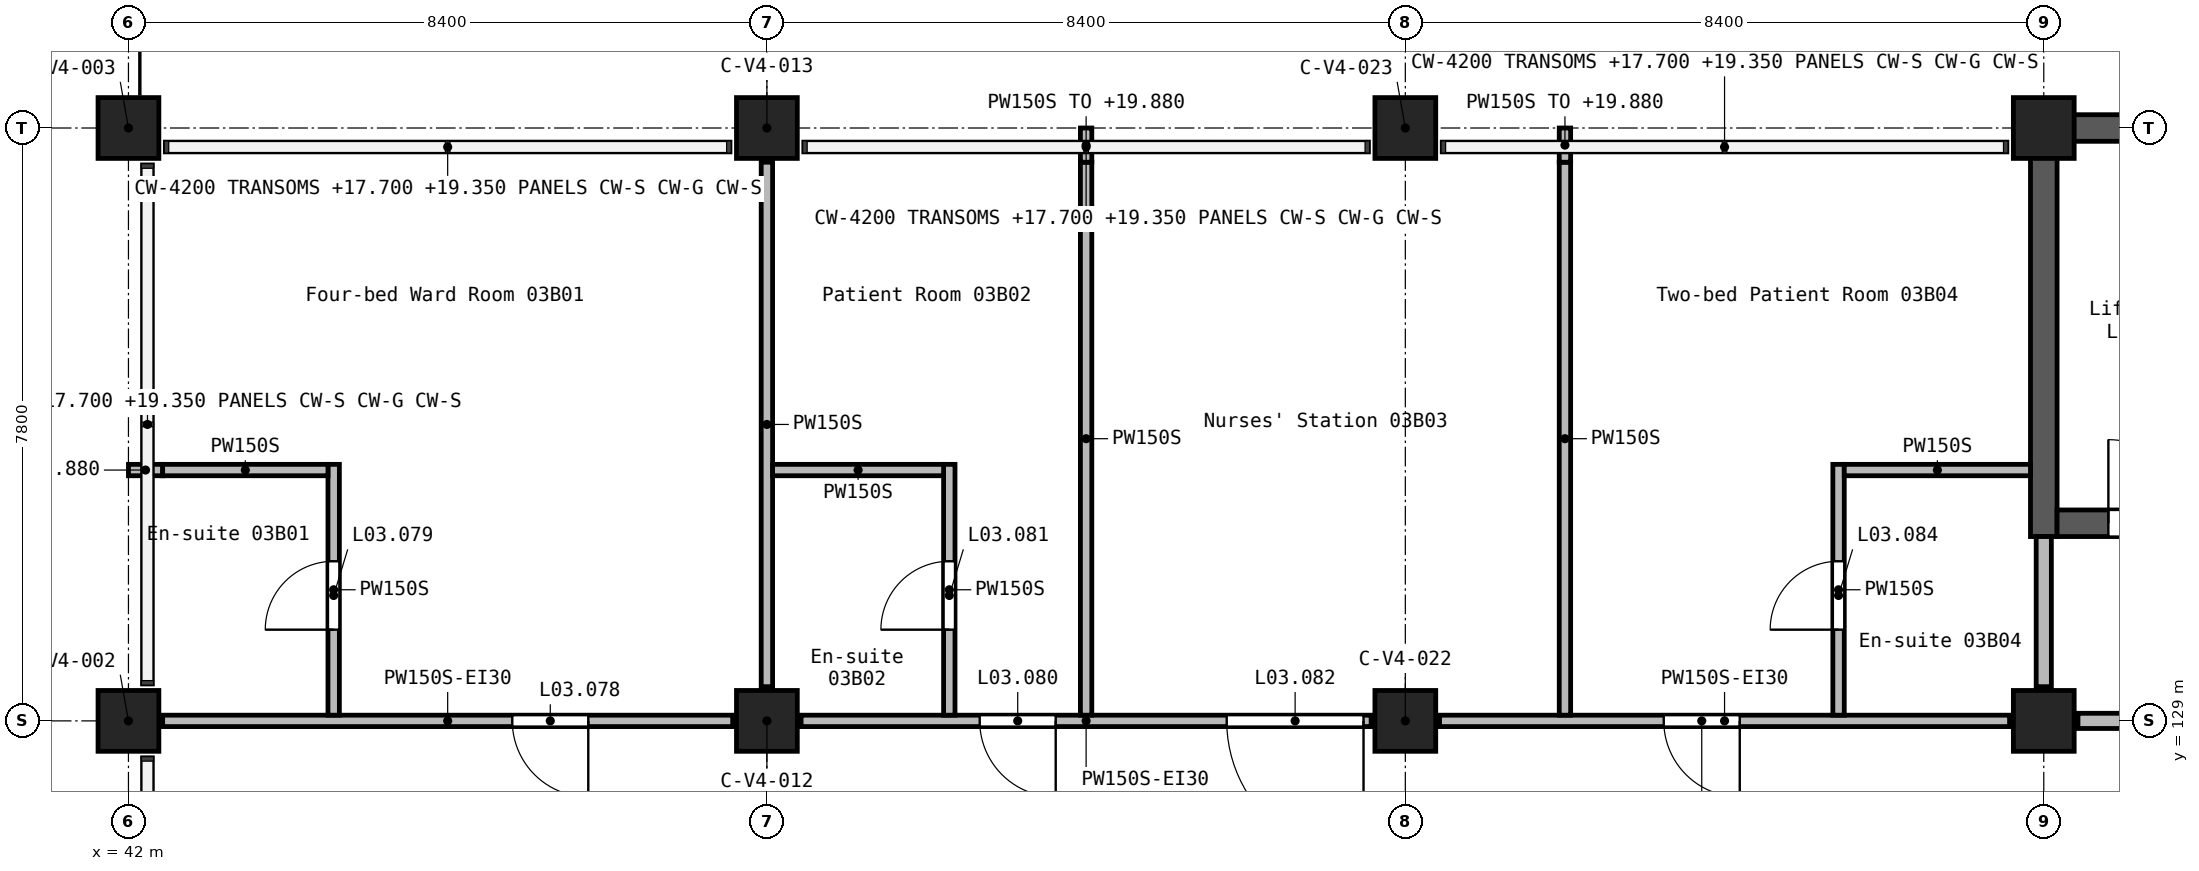
"""IFC4 building model, lengths in metres.
Left out: names, types, materials, properties, quantities, classifications, styles, units other than length and angle.
Written with IfcOpenShell. Run it as: python <this file> out.ifc"""

import sys

from ifc_helpers import new_model, si_unit, direction, frame, frame_2d, origin, origin_2d, place, context, subcontext, project, spatial, rectangle, extrude, element, fill, save


model = new_model("IFC4")
c1 = context("Model", 3, precision=1e-05, world=origin(), true_north=direction((0.0, 1.0)))
c2 = subcontext(c1, "Body", "Model", "MODEL_VIEW")
j1 = project(units=[si_unit("LENGTHUNIT", "METRE"), si_unit("PLANEANGLEUNIT", "RADIAN")], contexts=[c1])
p1 = place(None, origin())
s1 = spatial("IfcSite", under=j1, at=p1, CompositionType="ELEMENT")
p2 = place(p1, origin())
s2 = spatial("IfcBuilding", under=s1, at=p2, CompositionType="ELEMENT")
p3 = place(p2, frame((0.0, 0.0, 16.8)))
s3 = spatial("IfcBuildingStorey", under=s2, at=p3, CompositionType="ELEMENT", Elevation=16.8)
for number, where, z_axis, x_axis in (
    (1, (42.0, 129.0, 0.0), (0.0, 0.0, 1.0), (1.0, 0.0, 0.0)),
    (2, (42.0, 136.8, 0.0), (0.0, 0.0, 1.0), (1.0, 0.0, 0.0)),
    (3, (50.4, 129.0, 0.0), (0.0, 0.0, 1.0), (1.0, 0.0, 0.0)),
    (4, (50.4, 136.8, 0.0), (0.0, 0.0, 1.0), (1.0, 0.0, 0.0)),
    (5, (58.8, 129.0, 0.0), (0.0, 0.0, 1.0), (1.0, 0.0, 0.0)),
    (6, (58.8, 136.8, 0.0), (0.0, 0.0, 1.0), (1.0, 0.0, 0.0)),
    (7, (67.2, 129.0, 0.0), (0.0, 0.0, 1.0), (1.0, 0.0, 0.0)),
    (8, (67.2, 136.8, 0.0), (0.0, 0.0, 1.0), (1.0, 0.0, 0.0)),
):
    element("IfcColumn", number, at=place(p3, frame(where, z_axis=z_axis, x_axis=x_axis)), inside=s3, PredefinedType="COLUMN", context=c2, shape_type="SweptSolid", body=[
        extrude(rectangle(XDim=0.8, YDim=0.8, at=origin_2d()), origin(), (0.0, 0.0, 1.0), 4.2),
    ])
p4 = place(p3, frame((67.025, 136.8, 0.0), z_axis=(0.0, 0.0, 1.0), x_axis=(1.0, 0.0, 0.0)))
e9 = element("IfcWall", 9, at=p4, inside=s3, PredefinedType="SHEAR", context=c2, shape_type="SweptSolid", body=[
    extrude(rectangle(XDim=2.975, YDim=0.35, at=frame_2d((1.488, 0.0))), origin(), (0.0, 0.0, 1.0), 4.2),
])
p5 = place(p3, frame((67.2, 131.425, 0.0), z_axis=(0.0, 0.0, 1.0), x_axis=(0.0, 1.0, 0.0)))
e10 = element("IfcWall", 10, at=p5, inside=s3, PredefinedType="SHEAR", context=c2, shape_type="SweptSolid", body=[
    extrude(rectangle(XDim=5.2, YDim=0.35, at=frame_2d((2.6, 0.0))), origin(), (0.0, 0.0, 1.0), 4.2),
])
p6 = place(p3, frame((67.375, 131.6, 0.0), z_axis=(0.0, 0.0, 1.0), x_axis=(1.0, 0.0, 0.0)))
e11 = element("IfcWall", 11, at=p6, inside=s3, PredefinedType="SHEAR", context=c2, shape_type="SweptSolid", body=[
    extrude(rectangle(XDim=2.625, YDim=0.35, at=frame_2d((1.312, 0.0))), origin(), (0.0, 0.0, 1.0), 4.2),
])
p7 = place(p6, frame((0.675, 0.0, 0.0)))
e12 = element("IfcOpeningElement", 12, at=p7, cuts=e11, PredefinedType="OPENING", context=c2, shape_type="SweptSolid", body=[
    extrude(rectangle(XDim=1.1, YDim=2.1, at=frame_2d((0.55, 1.05))), frame((0.0, 0.185, 0.0), z_axis=(0.0, -1.0, 0.0), x_axis=(1.0, 0.0, 0.0)), (0.0, 0.0, 1.0), 0.37),
])
p8 = place(p3, frame((67.65, 129.0, 0.0), z_axis=(0.0, 0.0, 1.0), x_axis=(1.0, 0.0, 0.0)))
e13 = element("IfcWall", 13, at=p8, inside=s3, PredefinedType="SOLIDWALL", context=c2, shape_type="SweptSolid", body=[
    extrude(rectangle(XDim=7.5, YDim=0.2, at=frame_2d((3.75, 0.0))), origin(), (0.0, 0.0, 1.0), 3.9),
])
p9 = place(p8, frame((2.85, 0.0, 0.0)))
e14 = element("IfcOpeningElement", 14, at=p9, cuts=e13, PredefinedType="OPENING", context=c2, shape_type="SweptSolid", body=[
    extrude(rectangle(XDim=1.8, YDim=2.1, at=frame_2d((0.9, 1.05))), frame((0.0, 0.11, 0.0), z_axis=(0.0, -1.0, 0.0), x_axis=(1.0, 0.0, 0.0)), (0.0, 0.0, 1.0), 0.22),
])
p10 = place(p3, frame((67.2, 129.45, 0.0), z_axis=(0.0, 0.0, 1.0), x_axis=(0.0, 1.0, 0.0)))
e15 = element("IfcWall", 15, at=p10, inside=s3, PredefinedType="SOLIDWALL", context=c2, shape_type="SweptSolid", body=[
    extrude(rectangle(XDim=1.975, YDim=0.2, at=frame_2d((0.988, 0.0))), origin(), (0.0, 0.0, 1.0), 3.9),
])
p11 = place(p3, frame((66.75, 129.0, 0.0), z_axis=(0.0, 0.0, 1.0), x_axis=(-1.0, 0.0, 0.0)))
e16 = element("IfcWall", 16, at=p11, inside=s3, PredefinedType="PARTITIONING", context=c2, shape_type="SweptSolid", body=[
    extrude(rectangle(XDim=7.5, YDim=0.15, at=frame_2d((3.75, 0.0))), origin(), (0.0, 0.0, 1.0), 3.9),
])
p12 = place(p11, frame((3.55, 0.0, 0.0)))
e17 = element("IfcOpeningElement", 17, at=p12, cuts=e16, PredefinedType="OPENING", context=c2, shape_type="SweptSolid", body=[
    extrude(rectangle(XDim=1.0, YDim=2.1, at=frame_2d((0.5, 1.05))), frame((0.0, 0.085, 0.0), z_axis=(0.0, -1.0, 0.0), x_axis=(1.0, 0.0, 0.0)), (0.0, 0.0, 1.0), 0.17),
])
p13 = place(p3, frame((58.35, 129.0, 0.0), z_axis=(0.0, 0.0, 1.0), x_axis=(-1.0, 0.0, 0.0)))
e18 = element("IfcWall", 18, at=p13, inside=s3, PredefinedType="PARTITIONING", context=c2, shape_type="SweptSolid", body=[
    extrude(rectangle(XDim=7.5, YDim=0.15, at=frame_2d((3.75, 0.0))), origin(), (0.0, 0.0, 1.0), 3.9),
])
p14 = place(p13, frame((4.15, 0.0, 0.0)))
e19 = element("IfcOpeningElement", 19, at=p14, cuts=e18, PredefinedType="OPENING", context=c2, shape_type="SweptSolid", body=[
    extrude(rectangle(XDim=1.0, YDim=2.1, at=frame_2d((0.5, 1.05))), frame((0.0, 0.085, 0.0), z_axis=(0.0, -1.0, 0.0), x_axis=(1.0, 0.0, 0.0)), (0.0, 0.0, 1.0), 0.17),
])
p15 = place(p13, frame((0.1, 0.0, 0.0)))
e20 = element("IfcOpeningElement", 20, at=p15, cuts=e18, PredefinedType="OPENING", context=c2, shape_type="SweptSolid", body=[
    extrude(rectangle(XDim=1.8, YDim=2.1, at=frame_2d((0.9, 1.05))), frame((0.0, 0.085, 0.0), z_axis=(0.0, -1.0, 0.0), x_axis=(1.0, 0.0, 0.0)), (0.0, 0.0, 1.0), 0.17),
])
p16 = place(p3, frame((49.95, 129.0, 0.0), z_axis=(0.0, 0.0, 1.0), x_axis=(-1.0, 0.0, 0.0)))
e21 = element("IfcWall", 21, at=p16, inside=s3, PredefinedType="PARTITIONING", context=c2, shape_type="SweptSolid", body=[
    extrude(rectangle(XDim=7.5, YDim=0.15, at=frame_2d((3.75, 0.0))), origin(), (0.0, 0.0, 1.0), 3.9),
])
p17 = place(p16, frame((1.9, 0.0, 0.0)))
e22 = element("IfcOpeningElement", 22, at=p17, cuts=e21, PredefinedType="OPENING", context=c2, shape_type="SweptSolid", body=[
    extrude(rectangle(XDim=1.0, YDim=2.1, at=frame_2d((0.5, 1.05))), frame((0.0, 0.085, 0.0), z_axis=(0.0, -1.0, 0.0), x_axis=(1.0, 0.0, 0.0)), (0.0, 0.0, 1.0), 0.17),
])
p18 = place(p3, frame((50.4, 129.45, 0.0), z_axis=(0.0, 0.0, 1.0), x_axis=(0.0, 1.0, 0.0)))
e23 = element("IfcWall", 23, at=p18, inside=s3, PredefinedType="PARTITIONING", context=c2, shape_type="SweptSolid", body=[
    extrude(rectangle(XDim=6.9, YDim=0.15, at=frame_2d((3.45, 0.0))), origin(), (0.0, 0.0, 1.0), 3.9),
])
p19 = place(p3, frame((54.6, 129.075, 0.0), z_axis=(0.0, 0.0, 1.0), x_axis=(0.0, 1.0, 0.0)))
e24 = element("IfcWall", 24, at=p19, inside=s3, PredefinedType="PARTITIONING", context=c2, shape_type="SweptSolid", body=[
    extrude(rectangle(XDim=7.275, YDim=0.15, at=frame_2d((3.638, 0.0))), origin(), (0.0, 0.0, 1.0), 3.9),
])
p20 = place(p3, frame((54.6, 136.35, 0.0), z_axis=(0.0, 0.0, 1.0), x_axis=(0.0, 1.0, 0.0)))
e25 = element("IfcWall", 25, at=p20, inside=s3, PredefinedType="PARTITIONING", context=c2, shape_type="SweptSolid", body=[
    extrude(rectangle(XDim=0.45, YDim=0.15, at=frame_2d((0.225, 0.0))), origin(), (0.0, 0.0, 1.0), 3.08),
])
p21 = place(p3, frame((60.9, 129.075, 0.0), z_axis=(0.0, 0.0, 1.0), x_axis=(0.0, 1.0, 0.0)))
e26 = element("IfcWall", 26, at=p21, inside=s3, PredefinedType="PARTITIONING", context=c2, shape_type="SweptSolid", body=[
    extrude(rectangle(XDim=7.275, YDim=0.15, at=frame_2d((3.638, 0.0))), origin(), (0.0, 0.0, 1.0), 3.9),
])
p22 = place(p3, frame((60.9, 136.35, 0.0), z_axis=(0.0, 0.0, 1.0), x_axis=(0.0, 1.0, 0.0)))
e27 = element("IfcWall", 27, at=p22, inside=s3, PredefinedType="PARTITIONING", context=c2, shape_type="SweptSolid", body=[
    extrude(rectangle(XDim=0.45, YDim=0.15, at=frame_2d((0.225, 0.0))), origin(), (0.0, 0.0, 1.0), 3.08),
])
p23 = place(p3, frame((44.7, 129.075, 0.0), z_axis=(0.0, 0.0, 1.0), x_axis=(0.0, 1.0, 0.0)))
e28 = element("IfcWall", 28, at=p23, inside=s3, PredefinedType="PARTITIONING", context=c2, shape_type="SweptSolid", body=[
    extrude(rectangle(XDim=3.3, YDim=0.15, at=frame_2d((1.65, 0.0))), origin(), (0.0, 0.0, 1.0), 3.9),
])
p24 = place(p23, frame((1.125, 0.0, 0.0)))
e29 = element("IfcOpeningElement", 29, at=p24, cuts=e28, PredefinedType="OPENING", context=c2, shape_type="SweptSolid", body=[
    extrude(rectangle(XDim=0.9, YDim=2.1, at=frame_2d((0.45, 1.05))), frame((0.0, 0.085, 0.0), z_axis=(0.0, -1.0, 0.0), x_axis=(1.0, 0.0, 0.0)), (0.0, 0.0, 1.0), 0.17),
])
p25 = place(p3, frame((52.8, 129.075, 0.0), z_axis=(0.0, 0.0, 1.0), x_axis=(0.0, 1.0, 0.0)))
e30 = element("IfcWall", 30, at=p25, inside=s3, PredefinedType="PARTITIONING", context=c2, shape_type="SweptSolid", body=[
    extrude(rectangle(XDim=3.3, YDim=0.15, at=frame_2d((1.65, 0.0))), origin(), (0.0, 0.0, 1.0), 3.9),
])
p26 = place(p25, frame((1.125, 0.0, 0.0)))
e31 = element("IfcOpeningElement", 31, at=p26, cuts=e30, PredefinedType="OPENING", context=c2, shape_type="SweptSolid", body=[
    extrude(rectangle(XDim=0.9, YDim=2.1, at=frame_2d((0.45, 1.05))), frame((0.0, 0.085, 0.0), z_axis=(0.0, -1.0, 0.0), x_axis=(1.0, 0.0, 0.0)), (0.0, 0.0, 1.0), 0.17),
])
p27 = place(p3, frame((64.5, 129.075, 0.0), z_axis=(0.0, 0.0, 1.0), x_axis=(0.0, 1.0, 0.0)))
e32 = element("IfcWall", 32, at=p27, inside=s3, PredefinedType="PARTITIONING", context=c2, shape_type="SweptSolid", body=[
    extrude(rectangle(XDim=3.3, YDim=0.15, at=frame_2d((1.65, 0.0))), origin(), (0.0, 0.0, 1.0), 3.9),
])
p28 = place(p27, frame((1.125, 0.0, 0.0)))
e33 = element("IfcOpeningElement", 33, at=p28, cuts=e32, PredefinedType="OPENING", context=c2, shape_type="SweptSolid", body=[
    extrude(rectangle(XDim=0.9, YDim=2.1, at=frame_2d((0.45, 1.05))), frame((0.0, 0.085, 0.0), z_axis=(0.0, -1.0, 0.0), x_axis=(1.0, 0.0, 0.0)), (0.0, 0.0, 1.0), 0.17),
])
p29 = place(p3, frame((42.0, 132.3, 0.0), z_axis=(0.0, 0.0, 1.0), x_axis=(1.0, 0.0, 0.0)))
e34 = element("IfcWall", 34, at=p29, inside=s3, PredefinedType="PARTITIONING", context=c2, shape_type="SweptSolid", body=[
    extrude(rectangle(XDim=0.45, YDim=0.15, at=frame_2d((0.225, 0.0))), origin(), (0.0, 0.0, 1.0), 3.08),
])
p30 = place(p3, frame((42.45, 132.3, 0.0), z_axis=(0.0, 0.0, 1.0), x_axis=(1.0, 0.0, 0.0)))
e35 = element("IfcWall", 35, at=p30, inside=s3, PredefinedType="PARTITIONING", context=c2, shape_type="SweptSolid", body=[
    extrude(rectangle(XDim=2.175, YDim=0.15, at=frame_2d((1.087, 0.0))), origin(), (0.0, 0.0, 1.0), 3.9),
])
p31 = place(p3, frame((64.575, 132.3, 0.0), z_axis=(0.0, 0.0, 1.0), x_axis=(1.0, 0.0, 0.0)))
e36 = element("IfcWall", 36, at=p31, inside=s3, PredefinedType="PARTITIONING", context=c2, shape_type="SweptSolid", body=[
    extrude(rectangle(XDim=2.45, YDim=0.15, at=frame_2d((1.225, 0.0))), origin(), (0.0, 0.0, 1.0), 3.9),
])
p32 = place(p3, frame((50.475, 132.3, 0.0), z_axis=(0.0, 0.0, 1.0), x_axis=(1.0, 0.0, 0.0)))
e37 = element("IfcWall", 37, at=p32, inside=s3, PredefinedType="PARTITIONING", context=c2, shape_type="SweptSolid", body=[
    extrude(rectangle(XDim=2.25, YDim=0.15, at=frame_2d((1.125, 0.0))), origin(), (0.0, 0.0, 1.0), 3.9),
])
p33 = place(p17, frame((1.0, 0.0, 0.0), z_axis=(0.0, 0.0, 1.0), x_axis=(-1.0, 0.0, 0.0)))
e38 = element("IfcDoor", 38, at=p33, inside=s3, OperationType="SINGLE_SWING_RIGHT", PredefinedType="DOOR", context=c2, shape_type="SweptSolid", body=[
    extrude(rectangle(XDim=1.0, YDim=2.1, at=frame_2d((0.5, 1.05))), frame((0.0, 0.025, 0.0), z_axis=(0.0, -1.0, 0.0), x_axis=(1.0, 0.0, 0.0)), (0.0, 0.0, 1.0), 0.05),
])
fill(e22, e38)
p34 = place(p24, origin())
e39 = element("IfcDoor", 39, at=p34, inside=s3, OperationType="SINGLE_SWING_LEFT", PredefinedType="DOOR", context=c2, shape_type="SweptSolid", body=[
    extrude(rectangle(XDim=0.9, YDim=2.1, at=frame_2d((0.45, 1.05))), frame((0.0, 0.025, 0.0), z_axis=(0.0, -1.0, 0.0), x_axis=(1.0, 0.0, 0.0)), (0.0, 0.0, 1.0), 0.05),
])
fill(e29, e39)
p35 = place(p14, frame((1.0, 0.0, 0.0), z_axis=(0.0, 0.0, 1.0), x_axis=(-1.0, 0.0, 0.0)))
e40 = element("IfcDoor", 40, at=p35, inside=s3, OperationType="SINGLE_SWING_LEFT", PredefinedType="DOOR", context=c2, shape_type="SweptSolid", body=[
    extrude(rectangle(XDim=1.0, YDim=2.1, at=frame_2d((0.5, 1.05))), frame((0.0, 0.025, 0.0), z_axis=(0.0, -1.0, 0.0), x_axis=(1.0, 0.0, 0.0)), (0.0, 0.0, 1.0), 0.05),
])
fill(e19, e40)
p36 = place(p26, origin())
e41 = element("IfcDoor", 41, at=p36, inside=s3, OperationType="SINGLE_SWING_LEFT", PredefinedType="DOOR", context=c2, shape_type="SweptSolid", body=[
    extrude(rectangle(XDim=0.9, YDim=2.1, at=frame_2d((0.45, 1.05))), frame((0.0, 0.025, 0.0), z_axis=(0.0, -1.0, 0.0), x_axis=(1.0, 0.0, 0.0)), (0.0, 0.0, 1.0), 0.05),
])
fill(e31, e41)
p37 = place(p15, frame((1.8, 0.0, 0.0), z_axis=(0.0, 0.0, 1.0), x_axis=(-1.0, 0.0, 0.0)))
e42 = element("IfcDoor", 42, at=p37, inside=s3, OperationType="DOUBLE_DOOR_SINGLE_SWING", PredefinedType="DOOR", context=c2, shape_type="SweptSolid", body=[
    extrude(rectangle(XDim=1.8, YDim=2.1, at=frame_2d((0.9, 1.05))), frame((0.0, 0.025, 0.0), z_axis=(0.0, -1.0, 0.0), x_axis=(1.0, 0.0, 0.0)), (0.0, 0.0, 1.0), 0.05),
])
fill(e20, e42)
p38 = place(p12, frame((1.0, 0.0, 0.0), z_axis=(0.0, 0.0, 1.0), x_axis=(-1.0, 0.0, 0.0)))
e43 = element("IfcDoor", 43, at=p38, inside=s3, OperationType="SINGLE_SWING_LEFT", PredefinedType="DOOR", context=c2, shape_type="SweptSolid", body=[
    extrude(rectangle(XDim=1.0, YDim=2.1, at=frame_2d((0.5, 1.05))), frame((0.0, 0.025, 0.0), z_axis=(0.0, -1.0, 0.0), x_axis=(1.0, 0.0, 0.0)), (0.0, 0.0, 1.0), 0.05),
])
fill(e17, e43)
p39 = place(p28, frame((0.9, 0.0, 0.0), z_axis=(0.0, 0.0, 1.0), x_axis=(-1.0, 0.0, 0.0)))
e44 = element("IfcDoor", 44, at=p39, inside=s3, OperationType="SINGLE_SWING_RIGHT", PredefinedType="DOOR", context=c2, shape_type="SweptSolid", body=[
    extrude(rectangle(XDim=0.9, YDim=2.1, at=frame_2d((0.45, 1.05))), frame((0.0, 0.025, 0.0), z_axis=(0.0, -1.0, 0.0), x_axis=(1.0, 0.0, 0.0)), (0.0, 0.0, 1.0), 0.05),
])
fill(e33, e44)
p40 = place(p7, origin())
e45 = element("IfcDoor", 45, at=p40, inside=s3, OperationType="DOUBLE_DOOR_SLIDING", PredefinedType="DOOR", context=c2, shape_type="SweptSolid", body=[
    extrude(rectangle(XDim=1.1, YDim=2.1, at=frame_2d((0.55, 1.05))), frame((0.0, 0.025, 0.0), z_axis=(0.0, -1.0, 0.0), x_axis=(1.0, 0.0, 0.0)), (0.0, 0.0, 1.0), 0.05),
])
fill(e12, e45)
save(model, sys.argv[1])
